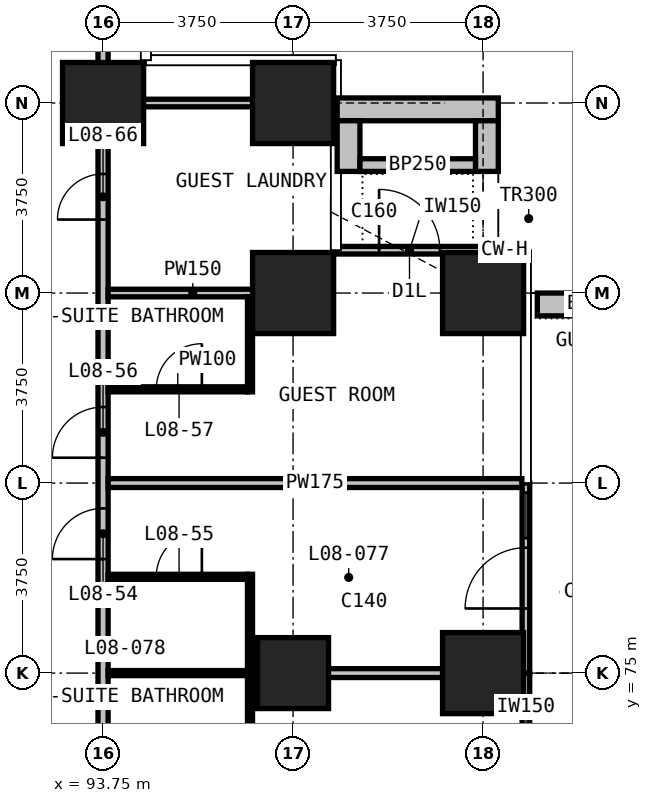
"""IFC4 building model, lengths in metres.
Left out: names, types, materials, properties, quantities, classifications, styles, units other than length and angle.
Written with IfcOpenShell. Run it as: python <this file> out.ifc"""

import sys

from ifc_helpers import new_model, si_unit, direction, frame, frame_2d, origin, origin_2d, place, context, subcontext, project, spatial, rectangle, extrude, element, fill, save


model = new_model("IFC4")
c1 = context("Model", 3, precision=1e-05, world=origin(), true_north=direction((0.0, 1.0)))
c2 = subcontext(c1, "Body", "Model", "MODEL_VIEW")
j1 = project(units=[si_unit("LENGTHUNIT", "METRE"), si_unit("PLANEANGLEUNIT", "RADIAN")], contexts=[c1])
p1 = place(None, origin())
s1 = spatial("IfcSite", under=j1, at=p1, CompositionType="ELEMENT")
p2 = place(p1, origin())
s2 = spatial("IfcBuilding", under=s1, at=p2, CompositionType="ELEMENT")
p3 = place(p2, frame((0.0, 0.0, 46.1)))
s3 = spatial("IfcBuildingStorey", under=s2, at=p3, CompositionType="ELEMENT", Elevation=46.1)
p4 = place(p3, frame((93.75, 86.25, 0.0), z_axis=(0.0, 0.0, 1.0), x_axis=(1.0, 0.0, 0.0)))
e1 = element("IfcColumn", 1, at=p4, inside=s3, PredefinedType="COLUMN", context=c2, shape_type="SweptSolid", body=[
    extrude(rectangle(XDim=1.6, YDim=1.6, at=origin_2d()), origin(), (0.0, 0.0, 1.0), 3.3),
])
p5 = place(p3, frame((97.5, 75.0, 0.0), z_axis=(0.0, 0.0, 1.0), x_axis=(1.0, 0.0, 0.0)))
e2 = element("IfcColumn", 2, at=p5, inside=s3, PredefinedType="COLUMN", context=c2, shape_type="SweptSolid", body=[
    extrude(rectangle(XDim=1.4, YDim=1.4, at=origin_2d()), origin(), (0.0, 0.0, 1.0), 3.3),
])
for number, where, z_axis, x_axis in (
    (3, (97.5, 82.5, 0.0), (0.0, 0.0, 1.0), (1.0, 0.0, 0.0)),
    (4, (97.5, 86.25, 0.0), (0.0, 0.0, 1.0), (1.0, 0.0, 0.0)),
    (5, (101.25, 75.0, 0.0), (0.0, 0.0, 1.0), (1.0, 0.0, 0.0)),
    (6, (101.25, 82.5, 0.0), (0.0, 0.0, 1.0), (1.0, 0.0, 0.0)),
):
    element("IfcColumn", number, at=place(p3, frame(where, z_axis=z_axis, x_axis=x_axis)), inside=s3, PredefinedType="COLUMN", context=c2, shape_type="SweptSolid", body=[
        extrude(rectangle(XDim=1.6, YDim=1.6, at=origin_2d()), origin(), (0.0, 0.0, 1.0), 3.3),
    ])
p6 = place(p3, frame((102.095, 71.25, 0.0), z_axis=(0.0, 0.0, 1.0), x_axis=(0.0, 1.0, 0.0)))
e7 = element("IfcWall", 7, at=p6, inside=s3, PredefinedType="SOLIDWALL", context=c2, shape_type="SweptSolid", body=[
    extrude(rectangle(XDim=3.75, YDim=0.15, at=frame_2d((1.875, 0.0))), origin(), (0.0, 0.0, 1.0), 3.0),
])
p7 = place(p6, frame((0.188, 0.0, 0.1)))
e8 = element("IfcOpeningElement", 8, at=p7, cuts=e7, PredefinedType="OPENING", context=c2, shape_type="SweptSolid", body=[
    extrude(rectangle(XDim=0.9, YDim=2.4, at=frame_2d((0.45, 1.2))), frame((0.0, 0.085, 0.0), z_axis=(0.0, -1.0, 0.0), x_axis=(1.0, 0.0, 0.0)), (0.0, 0.0, 1.0), 0.17),
])
p8 = place(p6, frame((1.275, 0.0, 0.0)))
e9 = element("IfcOpeningElement", 9, at=p8, cuts=e7, PredefinedType="OPENING", context=c2, shape_type="SweptSolid", body=[
    extrude(rectangle(XDim=1.2, YDim=2.4, at=frame_2d((0.6, 1.2))), frame((0.0, 0.085, 0.0), z_axis=(0.0, -1.0, 0.0), x_axis=(1.0, 0.0, 0.0)), (0.0, 0.0, 1.0), 0.17),
])
p9 = place(p3, frame((102.095, 75.0, 0.0), z_axis=(0.0, 0.0, 1.0), x_axis=(0.0, 1.0, 0.0)))
e10 = element("IfcWall", 10, at=p9, inside=s3, PredefinedType="SOLIDWALL", context=c2, shape_type="SweptSolid", body=[
    extrude(rectangle(XDim=3.75, YDim=0.15, at=frame_2d((1.875, 0.0))), origin(), (0.0, 0.0, 1.0), 3.0),
])
p10 = place(p9, frame((1.275, 0.0, 0.0)))
e11 = element("IfcOpeningElement", 11, at=p10, cuts=e10, PredefinedType="OPENING", context=c2, shape_type="SweptSolid", body=[
    extrude(rectangle(XDim=1.2, YDim=2.4, at=frame_2d((0.6, 1.2))), frame((0.0, 0.085, 0.0), z_axis=(0.0, -1.0, 0.0), x_axis=(1.0, 0.0, 0.0)), (0.0, 0.0, 1.0), 0.17),
])
p11 = place(p9, frame((2.663, 0.0, 0.1)))
e12 = element("IfcOpeningElement", 12, at=p11, cuts=e10, PredefinedType="OPENING", context=c2, shape_type="SweptSolid", body=[
    extrude(rectangle(XDim=0.9, YDim=2.4, at=frame_2d((0.45, 1.2))), frame((0.0, 0.085, 0.0), z_axis=(0.0, -1.0, 0.0), x_axis=(1.0, 0.0, 0.0)), (0.0, 0.0, 1.0), 0.17),
])
p12 = place(p3, frame((98.345, 83.345, 0.0), z_axis=(0.0, 0.0, 1.0), x_axis=(1.0, 0.0, 0.0)))
e13 = element("IfcWall", 13, at=p12, inside=s3, PredefinedType="SOLIDWALL", context=c2, shape_type="SweptSolid", body=[
    extrude(rectangle(XDim=2.905, YDim=0.15, at=frame_2d((1.453, 0.0))), origin(), (0.0, 0.0, 1.0), 3.0),
])
p13 = place(p12, frame((0.853, 0.0, 0.0)))
e14 = element("IfcOpeningElement", 14, at=p13, cuts=e13, PredefinedType="OPENING", context=c2, shape_type="SweptSolid", body=[
    extrude(rectangle(XDim=1.2, YDim=2.0, at=frame_2d((0.6, 1.0))), frame((0.0, 0.085, 0.0), z_axis=(0.0, -1.0, 0.0), x_axis=(1.0, 0.0, 0.0)), (0.0, 0.0, 1.0), 0.17),
])
p14 = place(p3, frame((102.32, 82.275, 0.0), z_axis=(0.0, 0.0, 1.0), x_axis=(1.0, 0.0, 0.0)))
e15 = element("IfcWall", 15, at=p14, inside=s3, PredefinedType="USERDEFINED", context=c2, shape_type="SweptSolid", body=[
    extrude(rectangle(XDim=2.33, YDim=0.45, at=frame_2d((1.165, 0.0))), origin(), (0.0, 0.0, 1.0), 1.1),
])
p15 = place(p3, frame((98.37, 86.125, 0.0), z_axis=(0.0, 0.0, 1.0), x_axis=(1.0, 0.0, 0.0)))
e16 = element("IfcWall", 16, at=p15, inside=s3, PredefinedType="USERDEFINED", context=c2, shape_type="SweptSolid", body=[
    extrude(rectangle(XDim=3.18, YDim=0.45, at=frame_2d((1.59, 0.0))), origin(), (0.0, 0.0, 1.0), 1.1),
])
for number, where, z_axis, x_axis in (
    (17, (98.595, 84.9, 0.0), (0.0, 0.0, 1.0), (0.0, 1.0, 0.0)),
    (18, (101.325, 84.9, 0.0), (0.0, 0.0, 1.0), (0.0, 1.0, 0.0)),
):
    element("IfcWall", number, at=place(p3, frame(where, z_axis=z_axis, x_axis=x_axis)), inside=s3, PredefinedType="USERDEFINED", context=c2, shape_type="SweptSolid", body=[
        extrude(rectangle(XDim=1.0, YDim=0.45, at=frame_2d((0.5, 0.0))), origin(), (0.0, 0.0, 1.0), 1.1),
    ])
p16 = place(p3, frame((98.82, 85.025, 0.0), z_axis=(0.0, 0.0, 1.0), x_axis=(1.0, 0.0, 0.0)))
e19 = element("IfcWall", 19, at=p16, inside=s3, PredefinedType="USERDEFINED", context=c2, shape_type="SweptSolid", body=[
    extrude(rectangle(XDim=2.28, YDim=0.25, at=frame_2d((1.14, 0.0))), origin(), (0.0, 0.0, 1.0), 1.0),
])
p17 = place(p3, frame((93.75, 52.4, 0.0), z_axis=(0.0, 0.0, 1.0), x_axis=(0.0, 1.0, 0.0)))
e20 = element("IfcWall", 20, at=p17, inside=s3, PredefinedType="PARTITIONING", context=c2, shape_type="SweptSolid", body=[
    extrude(rectangle(XDim=33.925, YDim=0.2, at=frame_2d((16.962, 0.0))), origin(), (0.0, 0.0, 1.0), 3.0),
])
p18 = place(p17, frame((2.35, 0.0, 0.0)))
e21 = element("IfcOpeningElement", 21, at=p18, cuts=e20, PredefinedType="OPENING", context=c2, shape_type="SweptSolid", body=[
    extrude(rectangle(XDim=1.0, YDim=2.2, at=frame_2d((0.5, 1.1))), frame((0.0, 0.11, 0.0), z_axis=(0.0, -1.0, 0.0), x_axis=(1.0, 0.0, 0.0)), (0.0, 0.0, 1.0), 0.22),
])
p19 = place(p17, frame((4.35, 0.0, 0.0)))
e22 = element("IfcOpeningElement", 22, at=p19, cuts=e20, PredefinedType="OPENING", context=c2, shape_type="SweptSolid", body=[
    extrude(rectangle(XDim=1.0, YDim=2.2, at=frame_2d((0.5, 1.1))), frame((0.0, 0.11, 0.0), z_axis=(0.0, -1.0, 0.0), x_axis=(1.0, 0.0, 0.0)), (0.0, 0.0, 1.0), 0.22),
])
p20 = place(p17, frame((9.85, 0.0, 0.0)))
e23 = element("IfcOpeningElement", 23, at=p20, cuts=e20, PredefinedType="OPENING", context=c2, shape_type="SweptSolid", body=[
    extrude(rectangle(XDim=1.0, YDim=2.2, at=frame_2d((0.5, 1.1))), frame((0.0, 0.11, 0.0), z_axis=(0.0, -1.0, 0.0), x_axis=(1.0, 0.0, 0.0)), (0.0, 0.0, 1.0), 0.22),
])
p21 = place(p17, frame((11.85, 0.0, 0.0)))
e24 = element("IfcOpeningElement", 24, at=p21, cuts=e20, PredefinedType="OPENING", context=c2, shape_type="SweptSolid", body=[
    extrude(rectangle(XDim=1.0, YDim=2.2, at=frame_2d((0.5, 1.1))), frame((0.0, 0.11, 0.0), z_axis=(0.0, -1.0, 0.0), x_axis=(1.0, 0.0, 0.0)), (0.0, 0.0, 1.0), 0.22),
])
p22 = place(p17, frame((17.35, 0.0, 0.0)))
e25 = element("IfcOpeningElement", 25, at=p22, cuts=e20, PredefinedType="OPENING", context=c2, shape_type="SweptSolid", body=[
    extrude(rectangle(XDim=1.0, YDim=2.2, at=frame_2d((0.5, 1.1))), frame((0.0, 0.11, 0.0), z_axis=(0.0, -1.0, 0.0), x_axis=(1.0, 0.0, 0.0)), (0.0, 0.0, 1.0), 0.22),
])
p23 = place(p17, frame((19.35, 0.0, 0.0)))
e26 = element("IfcOpeningElement", 26, at=p23, cuts=e20, PredefinedType="OPENING", context=c2, shape_type="SweptSolid", body=[
    extrude(rectangle(XDim=1.0, YDim=2.2, at=frame_2d((0.5, 1.1))), frame((0.0, 0.11, 0.0), z_axis=(0.0, -1.0, 0.0), x_axis=(1.0, 0.0, 0.0)), (0.0, 0.0, 1.0), 0.22),
])
p24 = place(p17, frame((24.85, 0.0, 0.0)))
e27 = element("IfcOpeningElement", 27, at=p24, cuts=e20, PredefinedType="OPENING", context=c2, shape_type="SweptSolid", body=[
    extrude(rectangle(XDim=1.0, YDim=2.2, at=frame_2d((0.5, 1.1))), frame((0.0, 0.11, 0.0), z_axis=(0.0, -1.0, 0.0), x_axis=(1.0, 0.0, 0.0)), (0.0, 0.0, 1.0), 0.22),
])
p25 = place(p17, frame((26.85, 0.0, 0.0)))
e28 = element("IfcOpeningElement", 28, at=p25, cuts=e20, PredefinedType="OPENING", context=c2, shape_type="SweptSolid", body=[
    extrude(rectangle(XDim=1.0, YDim=2.2, at=frame_2d((0.5, 1.1))), frame((0.0, 0.11, 0.0), z_axis=(0.0, -1.0, 0.0), x_axis=(1.0, 0.0, 0.0)), (0.0, 0.0, 1.0), 0.22),
])
p26 = place(p17, frame((31.55, 0.0, 0.0)))
e29 = element("IfcOpeningElement", 29, at=p26, cuts=e20, PredefinedType="OPENING", context=c2, shape_type="SweptSolid", body=[
    extrude(rectangle(XDim=0.9, YDim=2.2, at=frame_2d((0.45, 1.1))), frame((0.0, 0.11, 0.0), z_axis=(0.0, -1.0, 0.0), x_axis=(1.0, 0.0, 0.0)), (0.0, 0.0, 1.0), 0.22),
])
p27 = place(p3, frame((93.75, 86.28, 0.0), z_axis=(0.0, 0.0, 1.0), x_axis=(0.0, 1.0, 0.0)))
e30 = element("IfcWall", 30, at=p27, inside=s3, PredefinedType="PARTITIONING", context=c2, shape_type="SweptSolid", body=[
    extrude(rectangle(XDim=4.365, YDim=0.2, at=frame_2d((2.183, 0.0))), origin(), (0.0, 0.0, 1.0), 3.0),
])
p28 = place(p3, frame((96.7, 75.0, 0.0), z_axis=(0.0, 0.0, 1.0), x_axis=(1.0, 0.0, 0.0)))
e31 = element("IfcWall", 31, at=p28, inside=s3, PredefinedType="PARTITIONING", context=c2, shape_type="SweptSolid", body=[
    extrude(rectangle(XDim=5.315, YDim=0.175, at=frame_2d((2.657, 0.0))), origin(), (0.0, 0.0, 1.0), 3.0),
])
p29 = place(p3, frame((93.85, 78.75, 0.0), z_axis=(0.0, 0.0, 1.0), x_axis=(1.0, 0.0, 0.0)))
e32 = element("IfcWall", 32, at=p29, inside=s3, PredefinedType="PARTITIONING", context=c2, shape_type="SweptSolid", body=[
    extrude(rectangle(XDim=8.165, YDim=0.175, at=frame_2d((4.083, 0.0))), origin(), (0.0, 0.0, 1.0), 3.0),
])
p30 = place(p3, frame((93.85, 82.5, 0.0), z_axis=(0.0, 0.0, 1.0), x_axis=(1.0, 0.0, 0.0)))
e33 = element("IfcWall", 33, at=p30, inside=s3, PredefinedType="PARTITIONING", context=c2, shape_type="SweptSolid", body=[
    extrude(rectangle(XDim=3.34, YDim=0.15, at=frame_2d((1.67, 0.0))), origin(), (0.0, 0.0, 1.0), 3.0),
])
p31 = place(p3, frame((93.85, 86.25, 0.0), z_axis=(0.0, 0.0, 1.0), x_axis=(1.0, 0.0, 0.0)))
e34 = element("IfcWall", 34, at=p31, inside=s3, PredefinedType="PARTITIONING", context=c2, shape_type="SweptSolid", body=[
    extrude(rectangle(XDim=4.295, YDim=0.15, at=frame_2d((2.147, 0.0))), origin(), (0.0, 0.0, 1.0), 3.0),
])
p32 = place(p3, frame((97.265, 82.425, 0.0), z_axis=(0.0, 0.0, 1.0), x_axis=(0.0, 1.0, 0.0)))
e35 = element("IfcWall", 35, at=p32, inside=s3, PredefinedType="PARTITIONING", context=c2, shape_type="SweptSolid", body=[
    extrude(rectangle(XDim=0.84, YDim=0.15, at=frame_2d((0.42, 0.0))), origin(), (0.0, 0.0, 1.0), 3.0),
])
p33 = place(p3, frame((93.85, 75.0, 0.0), z_axis=(0.0, 0.0, 1.0), x_axis=(1.0, 0.0, 0.0)))
e36 = element("IfcWall", 36, at=p33, inside=s3, PredefinedType="PARTITIONING", context=c2, shape_type="SweptSolid", body=[
    extrude(rectangle(XDim=2.75, YDim=0.1, at=frame_2d((1.375, 0.0))), origin(), (0.0, 0.0, 1.0), 3.0),
])
p34 = place(p3, frame((93.85, 76.9, 0.0), z_axis=(0.0, 0.0, 1.0), x_axis=(1.0, 0.0, 0.0)))
e37 = element("IfcWall", 37, at=p34, inside=s3, PredefinedType="PARTITIONING", context=c2, shape_type="SweptSolid", body=[
    extrude(rectangle(XDim=2.75, YDim=0.1, at=frame_2d((1.375, 0.0))), origin(), (0.0, 0.0, 1.0), 3.0),
])
p35 = place(p34, frame((0.95, 0.0, 0.0)))
e38 = element("IfcOpeningElement", 38, at=p35, cuts=e37, PredefinedType="OPENING", context=c2, shape_type="SweptSolid", body=[
    extrude(rectangle(XDim=0.9, YDim=2.2, at=frame_2d((0.45, 1.1))), frame((0.0, 0.06, 0.0), z_axis=(0.0, -1.0, 0.0), x_axis=(1.0, 0.0, 0.0)), (0.0, 0.0, 1.0), 0.12),
])
p36 = place(p3, frame((93.85, 80.6, 0.0), z_axis=(0.0, 0.0, 1.0), x_axis=(1.0, 0.0, 0.0)))
e39 = element("IfcWall", 39, at=p36, inside=s3, PredefinedType="PARTITIONING", context=c2, shape_type="SweptSolid", body=[
    extrude(rectangle(XDim=2.75, YDim=0.1, at=frame_2d((1.375, 0.0))), origin(), (0.0, 0.0, 1.0), 3.0),
])
p37 = place(p36, frame((0.95, 0.0, 0.0)))
e40 = element("IfcOpeningElement", 40, at=p37, cuts=e39, PredefinedType="OPENING", context=c2, shape_type="SweptSolid", body=[
    extrude(rectangle(XDim=0.9, YDim=2.2, at=frame_2d((0.45, 1.1))), frame((0.0, 0.06, 0.0), z_axis=(0.0, -1.0, 0.0), x_axis=(1.0, 0.0, 0.0)), (0.0, 0.0, 1.0), 0.12),
])
p38 = place(p3, frame((96.65, 73.05, 0.0), z_axis=(0.0, 0.0, 1.0), x_axis=(0.0, 1.0, 0.0)))
e41 = element("IfcWall", 41, at=p38, inside=s3, PredefinedType="PARTITIONING", context=c2, shape_type="SweptSolid", body=[
    extrude(rectangle(XDim=3.9, YDim=0.1, at=frame_2d((1.95, 0.0))), origin(), (0.0, 0.0, 1.0), 3.0),
])
p39 = place(p3, frame((96.65, 80.55, 0.0), z_axis=(0.0, 0.0, 1.0), x_axis=(0.0, 1.0, 0.0)))
e42 = element("IfcWall", 42, at=p39, inside=s3, PredefinedType="PARTITIONING", context=c2, shape_type="SweptSolid", body=[
    extrude(rectangle(XDim=1.875, YDim=0.1, at=frame_2d((0.938, 0.0))), origin(), (0.0, 0.0, 1.0), 3.0),
])
p40 = place(p10, origin())
e43 = element("IfcDoor", 43, at=p40, inside=s3, OperationType="SINGLE_SWING_LEFT", PredefinedType="DOOR", context=c2, shape_type="SweptSolid", body=[
    extrude(rectangle(XDim=1.2, YDim=2.4, at=frame_2d((0.6, 1.2))), frame((0.0, 0.025, 0.0), z_axis=(0.0, -1.0, 0.0), x_axis=(1.0, 0.0, 0.0)), (0.0, 0.0, 1.0), 0.05),
])
fill(e11, e43)
p41 = place(p11, origin())
e44 = element("IfcWindow", 44, at=p41, inside=s3, PartitioningType="SINGLE_PANEL", PredefinedType="WINDOW", context=c2, shape_type="SweptSolid", body=[
    extrude(rectangle(XDim=0.9, YDim=2.4, at=frame_2d((0.45, 1.2))), frame((0.0, 0.03, 0.0), z_axis=(0.0, -1.0, 0.0), x_axis=(1.0, 0.0, 0.0)), (0.0, 0.0, 1.0), 0.06),
])
fill(e12, e44)
p42 = place(p13, origin())
e45 = element("IfcDoor", 45, at=p42, inside=s3, OperationType="SINGLE_SWING_LEFT", PredefinedType="DOOR", context=c2, shape_type="SweptSolid", body=[
    extrude(rectangle(XDim=1.2, YDim=2.0, at=frame_2d((0.6, 1.0))), frame((0.0, 0.025, 0.0), z_axis=(0.0, -1.0, 0.0), x_axis=(1.0, 0.0, 0.0)), (0.0, 0.0, 1.0), 0.05),
])
fill(e14, e45)
p43 = place(p24, origin())
e46 = element("IfcDoor", 46, at=p43, inside=s3, OperationType="SINGLE_SWING_LEFT", PredefinedType="DOOR", context=c2, shape_type="SweptSolid", body=[
    extrude(rectangle(XDim=1.0, YDim=2.2, at=frame_2d((0.5, 1.1))), frame((0.0, 0.025, 0.0), z_axis=(0.0, -1.0, 0.0), x_axis=(1.0, 0.0, 0.0)), (0.0, 0.0, 1.0), 0.05),
])
fill(e27, e46)
p44 = place(p35, origin())
e47 = element("IfcDoor", 47, at=p44, inside=s3, OperationType="SINGLE_SWING_RIGHT", PredefinedType="DOOR", context=c2, shape_type="SweptSolid", body=[
    extrude(rectangle(XDim=0.9, YDim=2.2, at=frame_2d((0.45, 1.1))), frame((0.0, 0.025, 0.0), z_axis=(0.0, -1.0, 0.0), x_axis=(1.0, 0.0, 0.0)), (0.0, 0.0, 1.0), 0.05),
])
fill(e38, e47)
p45 = place(p25, origin())
e48 = element("IfcDoor", 48, at=p45, inside=s3, OperationType="SINGLE_SWING_RIGHT", PredefinedType="DOOR", context=c2, shape_type="SweptSolid", body=[
    extrude(rectangle(XDim=1.0, YDim=2.2, at=frame_2d((0.5, 1.1))), frame((0.0, 0.025, 0.0), z_axis=(0.0, -1.0, 0.0), x_axis=(1.0, 0.0, 0.0)), (0.0, 0.0, 1.0), 0.05),
])
fill(e28, e48)
p46 = place(p37, origin())
e49 = element("IfcDoor", 49, at=p46, inside=s3, OperationType="SINGLE_SWING_RIGHT", PredefinedType="DOOR", context=c2, shape_type="SweptSolid", body=[
    extrude(rectangle(XDim=0.9, YDim=2.2, at=frame_2d((0.45, 1.1))), frame((0.0, 0.025, 0.0), z_axis=(0.0, -1.0, 0.0), x_axis=(1.0, 0.0, 0.0)), (0.0, 0.0, 1.0), 0.05),
])
fill(e40, e49)
p47 = place(p26, origin())
e50 = element("IfcDoor", 50, at=p47, inside=s3, OperationType="SINGLE_SWING_LEFT", PredefinedType="DOOR", context=c2, shape_type="SweptSolid", body=[
    extrude(rectangle(XDim=0.9, YDim=2.2, at=frame_2d((0.45, 1.1))), frame((0.0, 0.025, 0.0), z_axis=(0.0, -1.0, 0.0), x_axis=(1.0, 0.0, 0.0)), (0.0, 0.0, 1.0), 0.05),
])
fill(e29, e50)
save(model, sys.argv[1])
